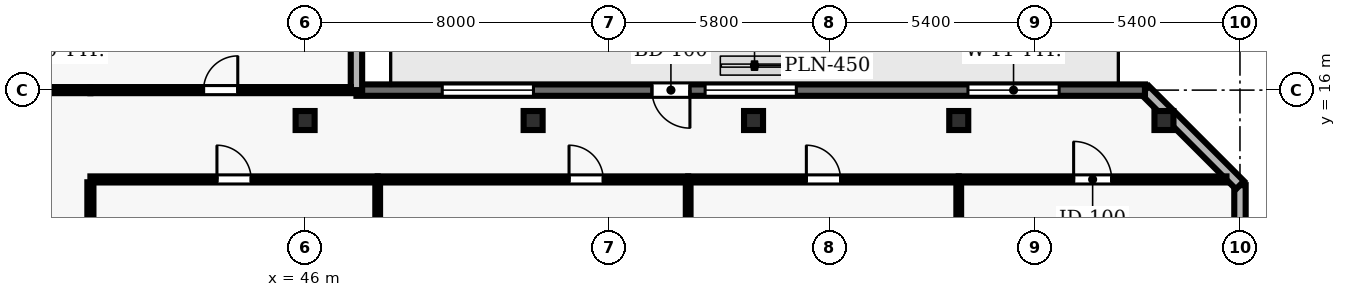
"""IFC4 building model, lengths in metres.
Left out: names, types, materials, properties, quantities, classifications, styles, units other than length and angle.
Written with IfcOpenShell. Run it as: python <this file> out.ifc"""

import sys

from ifc_helpers import new_model, si_unit, direction, frame, frame_2d, origin, origin_2d, place, context, subcontext, project, spatial, rectangle, hollow_rectangle, extrude, element, fill, save


model = new_model("IFC4")
c1 = context("Model", 3, precision=1e-05, world=origin(), true_north=direction((0.0, 1.0)))
c2 = subcontext(c1, "Body", "Model", "MODEL_VIEW")
j1 = project(units=[si_unit("LENGTHUNIT", "METRE"), si_unit("PLANEANGLEUNIT", "RADIAN")], contexts=[c1])
p1 = place(None, origin())
s1 = spatial("IfcSite", under=j1, at=p1, CompositionType="ELEMENT")
p2 = place(p1, origin())
s2 = spatial("IfcBuilding", under=s1, at=p2, CompositionType="ELEMENT")
p3 = place(p2, frame((0.0, 0.0, 126.8)))
s3 = spatial("IfcBuildingStorey", under=s2, at=p3, CompositionType="ELEMENT", Elevation=126.8)
for number, where, z_axis, x_axis in (
    (1, (46.0, 15.2, 0.0), (0.0, 0.0, 1.0), (1.0, 0.0, 0.0)),
    (2, (52.0, 15.2, 0.0), (0.0, 0.0, 1.0), (1.0, 0.0, 0.0)),
    (3, (57.8, 15.2, 0.0), (0.0, 0.0, 1.0), (1.0, 0.0, 0.0)),
    (4, (63.2, 15.2, 0.0), (0.0, 0.0, 1.0), (1.0, 0.0, 0.0)),
    (5, (68.6, 15.2, 0.0), (0.0, 0.0, 1.0), (1.0, 0.0, 0.0)),
):
    element("IfcColumn", number, at=place(p3, frame(where, z_axis=z_axis, x_axis=x_axis)), inside=s3, PredefinedType="COLUMN", context=c2, shape_type="SweptSolid", body=[
        extrude(hollow_rectangle(XDim=0.5, YDim=0.5, WallThickness=0.025, at=origin_2d()), origin(), (0.0, 0.0, 1.0), 3.9),
    ])
p4 = place(p3, frame((70.6, 2.5, 0.0), z_axis=(0.0, 0.0, 1.0), x_axis=(0.0, 1.0, 0.0)))
e6 = element("IfcWall", 6, at=p4, inside=s3, PredefinedType="SOLIDWALL", context=c2, shape_type="SweptSolid", body=[
    extrude(rectangle(XDim=11.0, YDim=0.3, at=frame_2d((5.5, 0.0))), origin(), (0.0, 0.0, 1.0), 3.69),
])
p5 = place(p4, frame((1.35, 0.0, 0.9)))
e7 = element("IfcOpeningElement", 7, at=p5, cuts=e6, PredefinedType="OPENING", context=c2, shape_type="SweptSolid", body=[
    extrude(rectangle(XDim=2.8, YDim=1.8, at=frame_2d((1.4, 0.9))), frame((0.0, 0.16, 0.0), z_axis=(0.0, -1.0, 0.0), x_axis=(1.0, 0.0, 0.0)), (0.0, 0.0, 1.0), 0.32),
])
p6 = place(p4, frame((6.85, 0.0, 0.9)))
e8 = element("IfcOpeningElement", 8, at=p6, cuts=e6, PredefinedType="OPENING", context=c2, shape_type="SweptSolid", body=[
    extrude(rectangle(XDim=2.8, YDim=1.8, at=frame_2d((1.4, 0.9))), frame((0.0, 0.16, 0.0), z_axis=(0.0, -1.0, 0.0), x_axis=(1.0, 0.0, 0.0)), (0.0, 0.0, 1.0), 0.32),
])
p7 = place(p3, frame((70.6, 13.5, 0.0), z_axis=(0.0, 0.0, 1.0), x_axis=(-0.707106781187, 0.707106781187, 0.0)))
e9 = element("IfcWall", 9, at=p7, inside=s3, PredefinedType="SOLIDWALL", context=c2, shape_type="SweptSolid", body=[
    extrude(rectangle(XDim=3.536, YDim=0.3, at=frame_2d((1.768, 0.0))), origin(), (0.0, 0.0, 1.0), 3.69),
])
p8 = place(p3, frame((68.1, 16.0, 0.0), z_axis=(0.0, 0.0, 1.0), x_axis=(-1.0, 0.0, 0.0)))
e10 = element("IfcWall", 10, at=p8, inside=s3, PredefinedType="SOLIDWALL", context=c2, shape_type="SweptSolid", body=[
    extrude(rectangle(XDim=20.749, YDim=0.3, at=frame_2d((10.375, 0.0))), origin(), (0.0, 0.0, 1.0), 3.69),
])
p9 = place(p8, frame((11.974, 0.0, 0.0)))
e11 = element("IfcOpeningElement", 11, at=p9, cuts=e10, PredefinedType="OPENING", context=c2, shape_type="SweptSolid", body=[
    extrude(rectangle(XDim=1.0, YDim=2.2, at=frame_2d((0.5, 1.1))), frame((0.0, 0.16, 0.0), z_axis=(0.0, -1.0, 0.0), x_axis=(1.0, 0.0, 0.0)), (0.0, 0.0, 1.0), 0.32),
])
p10 = place(p8, frame((2.258, 0.0, 0.9)))
e12 = element("IfcOpeningElement", 12, at=p10, cuts=e10, PredefinedType="OPENING", context=c2, shape_type="SweptSolid", body=[
    extrude(rectangle(XDim=2.4, YDim=2.2, at=frame_2d((1.2, 1.1))), frame((0.0, 0.16, 0.0), z_axis=(0.0, -1.0, 0.0), x_axis=(1.0, 0.0, 0.0)), (0.0, 0.0, 1.0), 0.32),
])
p11 = place(p8, frame((9.174, 0.0, 0.9)))
e13 = element("IfcOpeningElement", 13, at=p11, cuts=e10, PredefinedType="OPENING", context=c2, shape_type="SweptSolid", body=[
    extrude(rectangle(XDim=2.4, YDim=2.2, at=frame_2d((1.2, 1.1))), frame((0.0, 0.16, 0.0), z_axis=(0.0, -1.0, 0.0), x_axis=(1.0, 0.0, 0.0)), (0.0, 0.0, 1.0), 0.32),
])
p12 = place(p8, frame((16.091, 0.0, 0.9)))
e14 = element("IfcOpeningElement", 14, at=p12, cuts=e10, PredefinedType="OPENING", context=c2, shape_type="SweptSolid", body=[
    extrude(rectangle(XDim=2.4, YDim=2.2, at=frame_2d((1.2, 1.1))), frame((0.0, 0.16, 0.0), z_axis=(0.0, -1.0, 0.0), x_axis=(1.0, 0.0, 0.0)), (0.0, 0.0, 1.0), 0.32),
])
p13 = place(p3, frame((47.351, 16.0, 0.0), z_axis=(0.0, 0.0, 1.0), x_axis=(0.0, 1.0, 0.0)))
e15 = element("IfcWall", 15, at=p13, inside=s3, PredefinedType="SOLIDWALL", context=c2, shape_type="SweptSolid", body=[
    extrude(rectangle(XDim=10.7, YDim=0.3, at=frame_2d((5.35, 0.0))), origin(), (0.0, 0.0, 1.0), 3.69),
])
p14 = place(p13, frame((3.85, 0.0, 0.9)))
e16 = element("IfcOpeningElement", 16, at=p14, cuts=e15, PredefinedType="OPENING", context=c2, shape_type="SweptSolid", body=[
    extrude(rectangle(XDim=3.0, YDim=2.2, at=frame_2d((1.5, 1.1))), frame((0.0, 0.16, 0.0), z_axis=(0.0, -1.0, 0.0), x_axis=(1.0, 0.0, 0.0)), (0.0, 0.0, 1.0), 0.32),
])
p15 = place(p3, frame((40.35, 13.65, 0.0), z_axis=(0.0, 0.0, 1.0), x_axis=(1.0, 0.0, 0.0)))
e17 = element("IfcWall", 17, at=p15, inside=s3, PredefinedType="PARTITIONING", context=c2, shape_type="SweptSolid", body=[
    extrude(rectangle(XDim=7.56, YDim=0.16, at=frame_2d((3.78, 0.0))), origin(), (0.0, 0.0, 1.0), 3.69),
])
p16 = place(p15, frame((3.33, 0.0, 0.0)))
e18 = element("IfcOpeningElement", 18, at=p16, cuts=e17, PredefinedType="OPENING", context=c2, shape_type="SweptSolid", body=[
    extrude(rectangle(XDim=0.9, YDim=2.1, at=frame_2d((0.45, 1.05))), frame((0.0, 0.09, 0.0), z_axis=(0.0, -1.0, 0.0), x_axis=(1.0, 0.0, 0.0)), (0.0, 0.0, 1.0), 0.18),
])
p17 = place(p3, frame((40.35, 16.0, 0.0), z_axis=(0.0, 0.0, 1.0), x_axis=(-1.0, 0.0, 0.0)))
e19 = element("IfcWall", 19, at=p17, inside=s3, PredefinedType="PARTITIONING", context=c2, shape_type="SweptSolid", body=[
    extrude(rectangle(XDim=2.3, YDim=0.16, at=frame_2d((1.15, 0.0))), origin(), (0.0, 0.0, 1.0), 3.69),
])
p18 = place(p3, frame((40.35, 16.0, 0.0), z_axis=(0.0, 0.0, 1.0), x_axis=(1.0, 0.0, 0.0)))
e20 = element("IfcWall", 20, at=p18, inside=s3, PredefinedType="PARTITIONING", context=c2, shape_type="SweptSolid", body=[
    extrude(rectangle(XDim=6.856, YDim=0.16, at=frame_2d((3.428, 0.0))), origin(), (0.0, 0.0, 1.0), 3.39),
])
p19 = place(p18, frame((2.978, 0.0, 0.0)))
e21 = element("IfcOpeningElement", 21, at=p19, cuts=e20, PredefinedType="OPENING", context=c2, shape_type="SweptSolid", body=[
    extrude(rectangle(XDim=0.9, YDim=2.1, at=frame_2d((0.45, 1.05))), frame((0.0, 0.09, 0.0), z_axis=(0.0, -1.0, 0.0), x_axis=(1.0, 0.0, 0.0)), (0.0, 0.0, 1.0), 0.18),
])
p20 = place(p3, frame((47.91, 13.65, 0.0), z_axis=(0.0, 0.0, 1.0), x_axis=(1.0, 0.0, 0.0)))
e22 = element("IfcWall", 22, at=p20, inside=s3, PredefinedType="PARTITIONING", context=c2, shape_type="SweptSolid", body=[
    extrude(rectangle(XDim=8.17, YDim=0.16, at=frame_2d((4.085, 0.0))), origin(), (0.0, 0.0, 1.0), 3.69),
])
p21 = place(p20, frame((5.035, 0.0, 0.0)))
e23 = element("IfcOpeningElement", 23, at=p21, cuts=e22, PredefinedType="OPENING", context=c2, shape_type="SweptSolid", body=[
    extrude(rectangle(XDim=0.9, YDim=2.1, at=frame_2d((0.45, 1.05))), frame((0.0, 0.09, 0.0), z_axis=(0.0, -1.0, 0.0), x_axis=(1.0, 0.0, 0.0)), (0.0, 0.0, 1.0), 0.18),
])
p22 = place(p3, frame((56.08, 13.65, 0.0), z_axis=(0.0, 0.0, 1.0), x_axis=(1.0, 0.0, 0.0)))
e24 = element("IfcWall", 24, at=p22, inside=s3, PredefinedType="PARTITIONING", context=c2, shape_type="SweptSolid", body=[
    extrude(rectangle(XDim=7.12, YDim=0.16, at=frame_2d((3.56, 0.0))), origin(), (0.0, 0.0, 1.0), 3.69),
])
p23 = place(p22, frame((3.11, 0.0, 0.0)))
e25 = element("IfcOpeningElement", 25, at=p23, cuts=e24, PredefinedType="OPENING", context=c2, shape_type="SweptSolid", body=[
    extrude(rectangle(XDim=0.9, YDim=2.1, at=frame_2d((0.45, 1.05))), frame((0.0, 0.09, 0.0), z_axis=(0.0, -1.0, 0.0), x_axis=(1.0, 0.0, 0.0)), (0.0, 0.0, 1.0), 0.18),
])
p24 = place(p3, frame((63.2, 13.65, 0.0), z_axis=(0.0, 0.0, 1.0), x_axis=(1.0, 0.0, 0.0)))
e26 = element("IfcWall", 26, at=p24, inside=s3, PredefinedType="PARTITIONING", context=c2, shape_type="SweptSolid", body=[
    extrude(rectangle(XDim=7.045, YDim=0.16, at=frame_2d((3.522, 0.0))), origin(), (0.0, 0.0, 1.0), 3.69),
])
p25 = place(p24, frame((3.023, 0.0, 0.0)))
e27 = element("IfcOpeningElement", 27, at=p25, cuts=e26, PredefinedType="OPENING", context=c2, shape_type="SweptSolid", body=[
    extrude(rectangle(XDim=1.0, YDim=2.1, at=frame_2d((0.5, 1.05))), frame((0.0, 0.09, 0.0), z_axis=(0.0, -1.0, 0.0), x_axis=(1.0, 0.0, 0.0)), (0.0, 0.0, 1.0), 0.18),
])
p26 = place(p3, frame((40.35, 8.008, 0.0), z_axis=(0.0, 0.0, 1.0), x_axis=(0.0, 1.0, 0.0)))
e28 = element("IfcWall", 28, at=p26, inside=s3, PredefinedType="PARTITIONING", context=c2, shape_type="SweptSolid", body=[
    extrude(rectangle(XDim=5.567, YDim=0.16, at=frame_2d((2.783, 0.0))), origin(), (0.0, 0.0, 1.0), 3.69),
])
for number, where, z_axis, x_axis in (
    (29, (47.91, 8.035, 0.0), (0.0, 0.0, 1.0), (0.0, 1.0, 0.0)),
    (30, (56.08, 8.035, 0.0), (0.0, 0.0, 1.0), (0.0, 1.0, 0.0)),
):
    element("IfcWall", number, at=place(p3, frame(where, z_axis=z_axis, x_axis=x_axis)), inside=s3, PredefinedType="PARTITIONING", context=c2, shape_type="SweptSolid", body=[
        extrude(rectangle(XDim=5.54, YDim=0.125, at=frame_2d((2.77, 0.0))), origin(), (0.0, 0.0, 1.0), 3.69),
    ])
p27 = place(p3, frame((63.2, 8.008, 0.0), z_axis=(0.0, 0.0, 1.0), x_axis=(0.0, 1.0, 0.0)))
e31 = element("IfcWall", 31, at=p27, inside=s3, PredefinedType="PARTITIONING", context=c2, shape_type="SweptSolid", body=[
    extrude(rectangle(XDim=5.567, YDim=0.125, at=frame_2d((2.783, 0.0))), origin(), (0.0, 0.0, 1.0), 3.074),
])
p28 = place(p9, origin())
e32 = element("IfcDoor", 32, at=p28, inside=s3, OperationType="SINGLE_SWING_LEFT", PredefinedType="DOOR", context=c2, shape_type="SweptSolid", body=[
    extrude(rectangle(XDim=1.0, YDim=2.2, at=frame_2d((0.5, 1.1))), frame((0.0, 0.025, 0.0), z_axis=(0.0, -1.0, 0.0), x_axis=(1.0, 0.0, 0.0)), (0.0, 0.0, 1.0), 0.05),
])
fill(e11, e32)
p29 = place(p10, origin())
e33 = element("IfcWindow", 33, at=p29, inside=s3, PartitioningType="SINGLE_PANEL", PredefinedType="WINDOW", context=c2, shape_type="SweptSolid", body=[
    extrude(rectangle(XDim=2.4, YDim=2.2, at=frame_2d((1.2, 1.1))), frame((0.0, 0.03, 0.0), z_axis=(0.0, -1.0, 0.0), x_axis=(1.0, 0.0, 0.0)), (0.0, 0.0, 1.0), 0.06),
])
fill(e12, e33)
p30 = place(p11, origin())
e34 = element("IfcWindow", 34, at=p30, inside=s3, PartitioningType="SINGLE_PANEL", PredefinedType="WINDOW", context=c2, shape_type="SweptSolid", body=[
    extrude(rectangle(XDim=2.4, YDim=2.2, at=frame_2d((1.2, 1.1))), frame((0.0, 0.03, 0.0), z_axis=(0.0, -1.0, 0.0), x_axis=(1.0, 0.0, 0.0)), (0.0, 0.0, 1.0), 0.06),
])
fill(e13, e34)
p31 = place(p12, origin())
e35 = element("IfcWindow", 35, at=p31, inside=s3, PartitioningType="SINGLE_PANEL", PredefinedType="WINDOW", context=c2, shape_type="SweptSolid", body=[
    extrude(rectangle(XDim=2.4, YDim=2.2, at=frame_2d((1.2, 1.1))), frame((0.0, 0.03, 0.0), z_axis=(0.0, -1.0, 0.0), x_axis=(1.0, 0.0, 0.0)), (0.0, 0.0, 1.0), 0.06),
])
fill(e14, e35)
p32 = place(p16, origin())
e36 = element("IfcDoor", 36, at=p32, inside=s3, OperationType="SINGLE_SWING_LEFT", PredefinedType="DOOR", context=c2, shape_type="SweptSolid", body=[
    extrude(rectangle(XDim=0.9, YDim=2.1, at=frame_2d((0.45, 1.05))), frame((0.0, 0.025, 0.0), z_axis=(0.0, -1.0, 0.0), x_axis=(1.0, 0.0, 0.0)), (0.0, 0.0, 1.0), 0.05),
])
fill(e18, e36)
p33 = place(p21, origin())
e37 = element("IfcDoor", 37, at=p33, inside=s3, OperationType="SINGLE_SWING_LEFT", PredefinedType="DOOR", context=c2, shape_type="SweptSolid", body=[
    extrude(rectangle(XDim=0.9, YDim=2.1, at=frame_2d((0.45, 1.05))), frame((0.0, 0.025, 0.0), z_axis=(0.0, -1.0, 0.0), x_axis=(1.0, 0.0, 0.0)), (0.0, 0.0, 1.0), 0.05),
])
fill(e23, e37)
p34 = place(p23, origin())
e38 = element("IfcDoor", 38, at=p34, inside=s3, OperationType="SINGLE_SWING_LEFT", PredefinedType="DOOR", context=c2, shape_type="SweptSolid", body=[
    extrude(rectangle(XDim=0.9, YDim=2.1, at=frame_2d((0.45, 1.05))), frame((0.0, 0.025, 0.0), z_axis=(0.0, -1.0, 0.0), x_axis=(1.0, 0.0, 0.0)), (0.0, 0.0, 1.0), 0.05),
])
fill(e25, e38)
p35 = place(p25, origin())
e39 = element("IfcDoor", 39, at=p35, inside=s3, OperationType="SINGLE_SWING_LEFT", PredefinedType="DOOR", context=c2, shape_type="SweptSolid", body=[
    extrude(rectangle(XDim=1.0, YDim=2.1, at=frame_2d((0.5, 1.05))), frame((0.0, 0.025, 0.0), z_axis=(0.0, -1.0, 0.0), x_axis=(1.0, 0.0, 0.0)), (0.0, 0.0, 1.0), 0.05),
])
fill(e27, e39)
p36 = place(p19, origin())
e40 = element("IfcDoor", 40, at=p36, inside=s3, OperationType="SINGLE_SWING_RIGHT", PredefinedType="DOOR", context=c2, shape_type="SweptSolid", body=[
    extrude(rectangle(XDim=0.9, YDim=2.1, at=frame_2d((0.45, 1.05))), frame((0.0, 0.025, 0.0), z_axis=(0.0, -1.0, 0.0), x_axis=(1.0, 0.0, 0.0)), (0.0, 0.0, 1.0), 0.05),
])
fill(e21, e40)
save(model, sys.argv[1])
